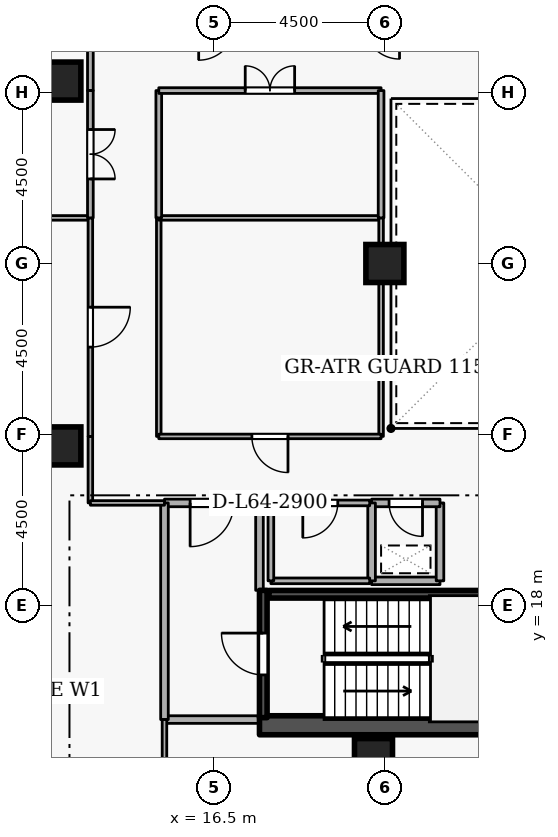
"""IFC4 building model, lengths in metres.
Left out: names, types, materials, properties, quantities, classifications, styles, units other than length and angle.
Written with IfcOpenShell. Run it as: python <this file> out.ifc"""

import sys

from ifc_helpers import new_model, si_unit, direction, frame, frame_2d, origin, origin_2d, place, context, subcontext, project, spatial, rectangle, extrude, element, fill, save


model = new_model("IFC4")
c1 = context("Model", 3, precision=1e-05, world=origin(), true_north=direction((0.0, 1.0)))
c2 = subcontext(c1, "Body", "Model", "MODEL_VIEW")
j1 = project(units=[si_unit("LENGTHUNIT", "METRE"), si_unit("PLANEANGLEUNIT", "RADIAN")], contexts=[c1])
p1 = place(None, origin())
s1 = spatial("IfcSite", under=j1, at=p1, CompositionType="ELEMENT")
p2 = place(p1, origin())
s2 = spatial("IfcBuilding", under=s1, at=p2, CompositionType="ELEMENT")
p3 = place(p2, frame((0.0, 0.0, 240.3)))
s3 = spatial("IfcBuildingStorey", under=s2, at=p3, CompositionType="ELEMENT", Elevation=240.3)
p4 = place(p3, frame((17.7, 14.85, 0.0), z_axis=(0.0, 0.0, 1.0), x_axis=(1.0, 0.0, 0.0)))
e1 = element("IfcWall", 1, at=p4, inside=s3, PredefinedType="SHEAR", context=c2, shape_type="SweptSolid", body=[
    extrude(rectangle(XDim=15.6, YDim=0.5, at=frame_2d((7.8, 0.0))), origin(), (0.0, 0.0, 1.0), 3.6),
])
for number, where, z_axis, x_axis in (
    (2, (12.5, 22.2, 0.0), (0.0, 0.0, 1.0), (1.0, 0.0, 0.0)),
    (3, (12.5, 31.8, 0.0), (0.0, 0.0, 1.0), (1.0, 0.0, 0.0)),
    (4, (20.7, 14.0, 0.0), (0.0, 0.0, 1.0), (1.0, 0.0, 0.0)),
    (5, (21.0, 27.0, 0.0), (0.0, 0.0, 1.0), (1.0, 0.0, 0.0)),
):
    element("IfcColumn", number, at=place(p3, frame(where, z_axis=z_axis, x_axis=x_axis)), inside=s3, PredefinedType="COLUMN", context=c2, shape_type="SweptSolid", body=[
        extrude(rectangle(XDim=1.0, YDim=1.0, at=origin_2d()), origin(), (0.0, 0.0, 1.0), 3.6),
    ])
p5 = place(p3, frame((17.8, 15.05, 0.0), z_axis=(0.0, 0.0, 1.0), x_axis=(0.0, 1.0, 0.0)))
e6 = element("IfcWall", 6, at=p5, inside=s3, PredefinedType="SHEAR", context=c2, shape_type="SweptSolid", body=[
    extrude(rectangle(XDim=3.35, YDim=0.2, at=frame_2d((1.675, 0.0))), origin(), (0.0, 0.0, 1.0), 3.6),
])
p6 = place(p5, frame((1.125, 0.0, 0.0)))
e7 = element("IfcOpeningElement", 7, at=p6, cuts=e6, PredefinedType="OPENING", context=c2, shape_type="SweptSolid", body=[
    extrude(rectangle(XDim=1.1, YDim=2.1, at=frame_2d((0.55, 1.05))), frame((0.0, 0.11, 0.0), z_axis=(0.0, -1.0, 0.0), x_axis=(1.0, 0.0, 0.0)), (0.0, 0.0, 1.0), 0.22),
])
p7 = place(p3, frame((25.05, 18.297, 0.0), z_axis=(0.0, 0.0, 1.0), x_axis=(-1.0, 0.0, 0.0)))
e8 = element("IfcWall", 8, at=p7, inside=s3, PredefinedType="SHEAR", context=c2, shape_type="SweptSolid", body=[
    extrude(rectangle(XDim=7.1, YDim=0.2, at=frame_2d((3.55, 0.0))), origin(), (0.0, 0.0, 1.0), 3.6),
])
p8 = place(p3, frame((15.2, 15.0, 0.0), z_axis=(0.0, 0.0, 1.0), x_axis=(1.0, 0.0, 0.0)))
e9 = element("IfcWall", 9, at=p8, inside=s3, PredefinedType="STANDARD", context=c2, shape_type="SweptSolid", body=[
    extrude(rectangle(XDim=2.5, YDim=0.2, at=frame_2d((1.25, 0.0))), origin(), (0.0, 0.0, 1.0), 3.34),
])
p9 = place(p3, frame((17.7, 18.4, 0.0), z_axis=(0.0, 0.0, 1.0), x_axis=(0.0, 1.0, 0.0)))
e10 = element("IfcWall", 10, at=p9, inside=s3, PredefinedType="STANDARD", context=c2, shape_type="SweptSolid", body=[
    extrude(rectangle(XDim=2.3, YDim=0.2, at=frame_2d((1.15, 0.0))), origin(), (0.0, 0.0, 1.0), 2.545),
])
p10 = place(p3, frame((17.7, 20.7, 0.0), z_axis=(0.0, 0.0, 1.0), x_axis=(-1.0, 0.0, 0.0)))
e11 = element("IfcWall", 11, at=p10, inside=s3, PredefinedType="STANDARD", context=c2, shape_type="SweptSolid", body=[
    extrude(rectangle(XDim=2.5, YDim=0.2, at=frame_2d((1.25, 0.0))), origin(), (0.0, 0.0, 1.0), 3.34),
])
p11 = place(p10, frame((0.675, 0.0, 0.0)))
e12 = element("IfcOpeningElement", 12, at=p11, cuts=e11, PredefinedType="OPENING", context=c2, shape_type="SweptSolid", body=[
    extrude(rectangle(XDim=1.15, YDim=2.1, at=frame_2d((0.575, 1.05))), frame((0.0, 0.11, 0.0), z_axis=(0.0, -1.0, 0.0), x_axis=(1.0, 0.0, 0.0)), (0.0, 0.0, 1.0), 0.22),
])
p12 = place(p3, frame((15.2, 20.7, 0.0), z_axis=(0.0, 0.0, 1.0), x_axis=(0.0, -1.0, 0.0)))
e13 = element("IfcWall", 13, at=p12, inside=s3, PredefinedType="STANDARD", context=c2, shape_type="SweptSolid", body=[
    extrude(rectangle(XDim=5.7, YDim=0.2, at=frame_2d((2.85, 0.0))), origin(), (0.0, 0.0, 1.0), 3.34),
])
p13 = place(p3, frame((20.65, 18.65, 0.0), z_axis=(0.0, 0.0, 1.0), x_axis=(1.0, 0.0, 0.0)))
e14 = element("IfcWall", 14, at=p13, inside=s3, PredefinedType="STANDARD", context=c2, shape_type="SweptSolid", body=[
    extrude(rectangle(XDim=1.8, YDim=0.2, at=frame_2d((0.9, 0.0))), origin(), (0.0, 0.0, 1.0), 3.34),
])
p14 = place(p3, frame((22.45, 18.65, 0.0), z_axis=(0.0, 0.0, 1.0), x_axis=(0.0, 1.0, 0.0)))
e15 = element("IfcWall", 15, at=p14, inside=s3, PredefinedType="STANDARD", context=c2, shape_type="SweptSolid", body=[
    extrude(rectangle(XDim=2.05, YDim=0.2, at=frame_2d((1.025, 0.0))), origin(), (0.0, 0.0, 1.0), 3.34),
])
p15 = place(p3, frame((22.45, 20.7, 0.0), z_axis=(0.0, 0.0, 1.0), x_axis=(-1.0, 0.0, 0.0)))
e16 = element("IfcWall", 16, at=p15, inside=s3, PredefinedType="STANDARD", context=c2, shape_type="SweptSolid", body=[
    extrude(rectangle(XDim=1.8, YDim=0.2, at=frame_2d((0.9, 0.0))), origin(), (0.0, 0.0, 1.0), 3.34),
])
p16 = place(p15, frame((0.46, 0.0, 0.0)))
e17 = element("IfcOpeningElement", 17, at=p16, cuts=e16, PredefinedType="OPENING", context=c2, shape_type="SweptSolid", body=[
    extrude(rectangle(XDim=0.88, YDim=2.04, at=frame_2d((0.44, 1.02))), frame((0.0, 0.11, 0.0), z_axis=(0.0, -1.0, 0.0), x_axis=(1.0, 0.0, 0.0)), (0.0, 0.0, 1.0), 0.22),
])
p17 = place(p3, frame((20.65, 20.7, 0.0), z_axis=(0.0, 0.0, 1.0), x_axis=(0.0, -1.0, 0.0)))
e18 = element("IfcWall", 18, at=p17, inside=s3, PredefinedType="STANDARD", context=c2, shape_type="SweptSolid", body=[
    extrude(rectangle(XDim=2.05, YDim=0.2, at=frame_2d((1.025, 0.0))), origin(), (0.0, 0.0, 1.0), 3.34),
])
p18 = place(p3, frame((18.0, 18.65, 0.0), z_axis=(0.0, 0.0, 1.0), x_axis=(1.0, 0.0, 0.0)))
e19 = element("IfcWall", 19, at=p18, inside=s3, PredefinedType="PARTITIONING", context=c2, shape_type="SweptSolid", body=[
    extrude(rectangle(XDim=2.6, YDim=0.15, at=frame_2d((1.3, 0.0))), origin(), (0.0, 0.0, 1.0), 3.34),
])
p19 = place(p3, frame((20.6, 20.7, 0.0), z_axis=(0.0, 0.0, 1.0), x_axis=(-1.0, 0.0, 0.0)))
e20 = element("IfcWall", 20, at=p19, inside=s3, PredefinedType="PARTITIONING", context=c2, shape_type="SweptSolid", body=[
    extrude(rectangle(XDim=2.6, YDim=0.15, at=frame_2d((1.3, 0.0))), origin(), (0.0, 0.0, 1.0), 3.34),
])
p20 = place(p19, frame((0.84, 0.0, 0.0)))
e21 = element("IfcOpeningElement", 21, at=p20, cuts=e20, PredefinedType="OPENING", context=c2, shape_type="SweptSolid", body=[
    extrude(rectangle(XDim=0.92, YDim=2.08, at=frame_2d((0.46, 1.04))), frame((0.0, 0.085, 0.0), z_axis=(0.0, -1.0, 0.0), x_axis=(1.0, 0.0, 0.0)), (0.0, 0.0, 1.0), 0.17),
])
p21 = place(p3, frame((18.0, 20.7, 0.0), z_axis=(0.0, 0.0, 1.0), x_axis=(0.0, -1.0, 0.0)))
e22 = element("IfcWall", 22, at=p21, inside=s3, PredefinedType="PARTITIONING", context=c2, shape_type="SweptSolid", body=[
    extrude(rectangle(XDim=2.05, YDim=0.15, at=frame_2d((1.025, 0.0))), origin(), (0.0, 0.0, 1.0), 2.545),
])
p22 = place(p3, frame((13.25, 22.45, 0.0), z_axis=(0.0, 0.0, 1.0), x_axis=(0.0, -1.0, 0.0)))
e23 = element("IfcWall", 23, at=p22, inside=s3, PredefinedType="PARTITIONING", context=c2, shape_type="SweptSolid", body=[
    extrude(rectangle(XDim=1.75, YDim=0.12, at=frame_2d((0.875, 0.0))), origin(), (0.0, 0.0, 1.0), 3.34),
])
p23 = place(p3, frame((13.25, 20.7, 0.0), z_axis=(0.0, 0.0, 1.0), x_axis=(1.0, 0.0, 0.0)))
e24 = element("IfcWall", 24, at=p23, inside=s3, PredefinedType="PARTITIONING", context=c2, shape_type="SweptSolid", body=[
    extrude(rectangle(XDim=1.95, YDim=0.12, at=frame_2d((0.975, 0.0))), origin(), (0.0, 0.0, 1.0), 3.34),
])
p24 = place(p3, frame((15.2, 15.0, 0.0), z_axis=(0.0, 0.0, 1.0), x_axis=(0.0, -1.0, 0.0)))
e25 = element("IfcWall", 25, at=p24, inside=s3, PredefinedType="PARTITIONING", context=c2, shape_type="SweptSolid", body=[
    extrude(rectangle(XDim=11.72, YDim=0.12, at=frame_2d((5.86, 0.0))), origin(), (0.0, 0.0, 1.0), 3.34),
])
p25 = place(p3, frame((1.78, 28.2, 0.0), z_axis=(0.0, 0.0, 1.0), x_axis=(1.0, 0.0, 0.0)))
e26 = element("IfcWall", 26, at=p25, inside=s3, PredefinedType="PARTITIONING", context=c2, shape_type="SweptSolid", body=[
    extrude(rectangle(XDim=11.47, YDim=0.12, at=frame_2d((5.735, 0.0))), origin(), (0.0, 0.0, 1.0), 3.34),
])
p26 = place(p3, frame((13.25, 28.2, 0.0), z_axis=(0.0, 0.0, 1.0), x_axis=(0.0, -1.0, 0.0)))
e27 = element("IfcWall", 27, at=p26, inside=s3, PredefinedType="PARTITIONING", context=c2, shape_type="SweptSolid", body=[
    extrude(rectangle(XDim=5.75, YDim=0.12, at=frame_2d((2.875, 0.0))), origin(), (0.0, 0.0, 1.0), 3.34),
])
p27 = place(p26, frame((2.35, 0.0, 0.0)))
e28 = element("IfcOpeningElement", 28, at=p27, cuts=e27, PredefinedType="OPENING", context=c2, shape_type="SweptSolid", body=[
    extrude(rectangle(XDim=1.05, YDim=2.1, at=frame_2d((0.525, 1.05))), frame((0.0, 0.07, 0.0), z_axis=(0.0, -1.0, 0.0), x_axis=(1.0, 0.0, 0.0)), (0.0, 0.0, 1.0), 0.14),
])
p28 = place(p3, frame((13.25, 33.3, 0.0), z_axis=(0.0, 0.0, 1.0), x_axis=(0.0, -1.0, 0.0)))
e29 = element("IfcWall", 29, at=p28, inside=s3, PredefinedType="PARTITIONING", context=c2, shape_type="SweptSolid", body=[
    extrude(rectangle(XDim=1.75, YDim=0.15, at=frame_2d((0.875, 0.0))), origin(), (0.0, 0.0, 1.0), 3.34),
])
p29 = place(p3, frame((13.25, 31.55, 0.0), z_axis=(0.0, 0.0, 1.0), x_axis=(0.0, -1.0, 0.0)))
e30 = element("IfcWall", 30, at=p29, inside=s3, PredefinedType="PARTITIONING", context=c2, shape_type="SweptSolid", body=[
    extrude(rectangle(XDim=3.35, YDim=0.15, at=frame_2d((1.675, 0.0))), origin(), (0.0, 0.0, 1.0), 3.34),
])
p30 = place(p29, frame((1.025, 0.0, 0.0)))
e31 = element("IfcOpeningElement", 31, at=p30, cuts=e30, PredefinedType="OPENING", context=c2, shape_type="SweptSolid", body=[
    extrude(rectangle(XDim=1.3, YDim=2.12, at=frame_2d((0.65, 1.06))), frame((0.0, 0.085, 0.0), z_axis=(0.0, -1.0, 0.0), x_axis=(1.0, 0.0, 0.0)), (0.0, 0.0, 1.0), 0.17),
])
p31 = place(p3, frame((15.05, 22.45, 0.0), z_axis=(0.0, 0.0, 1.0), x_axis=(0.0, 1.0, 0.0)))
e32 = element("IfcWall", 32, at=p31, inside=s3, PredefinedType="PARTITIONING", context=c2, shape_type="SweptSolid", body=[
    extrude(rectangle(XDim=5.75, YDim=0.12, at=frame_2d((2.875, 0.0))), origin(), (0.0, 0.0, 1.0), 3.34),
])
p32 = place(p3, frame((15.05, 28.2, 0.0), z_axis=(0.0, 0.0, 1.0), x_axis=(1.0, 0.0, 0.0)))
e33 = element("IfcWall", 33, at=p32, inside=s3, PredefinedType="PARTITIONING", context=c2, shape_type="SweptSolid", body=[
    extrude(rectangle(XDim=5.85, YDim=0.12, at=frame_2d((2.925, 0.0))), origin(), (0.0, 0.0, 1.0), 3.34),
])
p33 = place(p3, frame((20.9, 28.2, 0.0), z_axis=(0.0, 0.0, 1.0), x_axis=(0.0, -1.0, 0.0)))
e34 = element("IfcWall", 34, at=p33, inside=s3, PredefinedType="PARTITIONING", context=c2, shape_type="SweptSolid", body=[
    extrude(rectangle(XDim=5.75, YDim=0.12, at=frame_2d((2.875, 0.0))), origin(), (0.0, 0.0, 1.0), 3.34),
])
p34 = place(p3, frame((20.9, 22.45, 0.0), z_axis=(0.0, 0.0, 1.0), x_axis=(-1.0, 0.0, 0.0)))
e35 = element("IfcWall", 35, at=p34, inside=s3, PredefinedType="PARTITIONING", context=c2, shape_type="SweptSolid", body=[
    extrude(rectangle(XDim=5.85, YDim=0.12, at=frame_2d((2.925, 0.0))), origin(), (0.0, 0.0, 1.0), 3.34),
])
p35 = place(p34, frame((2.45, 0.0, 0.0)))
e36 = element("IfcOpeningElement", 36, at=p35, cuts=e35, PredefinedType="OPENING", context=c2, shape_type="SweptSolid", body=[
    extrude(rectangle(XDim=0.95, YDim=2.1, at=frame_2d((0.475, 1.05))), frame((0.0, 0.07, 0.0), z_axis=(0.0, -1.0, 0.0), x_axis=(1.0, 0.0, 0.0)), (0.0, 0.0, 1.0), 0.14),
])
p36 = place(p3, frame((15.05, 28.2, 0.0), z_axis=(0.0, 0.0, 1.0), x_axis=(0.0, 1.0, 0.0)))
e37 = element("IfcWall", 37, at=p36, inside=s3, PredefinedType="PARTITIONING", context=c2, shape_type="SweptSolid", body=[
    extrude(rectangle(XDim=3.35, YDim=0.15, at=frame_2d((1.675, 0.0))), origin(), (0.0, 0.0, 1.0), 3.34),
])
p37 = place(p3, frame((15.05, 31.55, 0.0), z_axis=(0.0, 0.0, 1.0), x_axis=(1.0, 0.0, 0.0)))
e38 = element("IfcWall", 38, at=p37, inside=s3, PredefinedType="PARTITIONING", context=c2, shape_type="SweptSolid", body=[
    extrude(rectangle(XDim=5.85, YDim=0.15, at=frame_2d((2.925, 0.0))), origin(), (0.0, 0.0, 1.0), 3.34),
])
p38 = place(p37, frame((2.275, 0.0, 0.0)))
e39 = element("IfcOpeningElement", 39, at=p38, cuts=e38, PredefinedType="OPENING", context=c2, shape_type="SweptSolid", body=[
    extrude(rectangle(XDim=1.3, YDim=2.12, at=frame_2d((0.65, 1.06))), frame((0.0, 0.085, 0.0), z_axis=(0.0, -1.0, 0.0), x_axis=(1.0, 0.0, 0.0)), (0.0, 0.0, 1.0), 0.17),
])
p39 = place(p3, frame((20.9, 31.55, 0.0), z_axis=(0.0, 0.0, 1.0), x_axis=(0.0, -1.0, 0.0)))
e40 = element("IfcWall", 40, at=p39, inside=s3, PredefinedType="PARTITIONING", context=c2, shape_type="SweptSolid", body=[
    extrude(rectangle(XDim=3.35, YDim=0.15, at=frame_2d((1.675, 0.0))), origin(), (0.0, 0.0, 1.0), 3.34),
])
p40 = place(p6, origin())
e41 = element("IfcDoor", 41, at=p40, inside=s3, OperationType="SINGLE_SWING_RIGHT", PredefinedType="DOOR", context=c2, shape_type="SweptSolid", body=[
    extrude(rectangle(XDim=1.1, YDim=2.1, at=frame_2d((0.55, 1.05))), frame((0.0, 0.025, 0.0), z_axis=(0.0, -1.0, 0.0), x_axis=(1.0, 0.0, 0.0)), (0.0, 0.0, 1.0), 0.05),
])
fill(e7, e41)
p41 = place(p11, origin())
e42 = element("IfcDoor", 42, at=p41, inside=s3, OperationType="SINGLE_SWING_RIGHT", PredefinedType="DOOR", context=c2, shape_type="SweptSolid", body=[
    extrude(rectangle(XDim=1.15, YDim=2.1, at=frame_2d((0.575, 1.05))), frame((0.0, 0.025, 0.0), z_axis=(0.0, -1.0, 0.0), x_axis=(1.0, 0.0, 0.0)), (0.0, 0.0, 1.0), 0.05),
])
fill(e12, e42)
p42 = place(p16, origin())
e43 = element("IfcDoor", 43, at=p42, inside=s3, OperationType="SINGLE_SWING_LEFT", PredefinedType="DOOR", context=c2, shape_type="SweptSolid", body=[
    extrude(rectangle(XDim=0.88, YDim=2.04, at=frame_2d((0.44, 1.02))), frame((0.0, 0.025, 0.0), z_axis=(0.0, -1.0, 0.0), x_axis=(1.0, 0.0, 0.0)), (0.0, 0.0, 1.0), 0.05),
])
fill(e17, e43)
p43 = place(p20, origin())
e44 = element("IfcDoor", 44, at=p43, inside=s3, OperationType="SINGLE_SWING_RIGHT", PredefinedType="DOOR", context=c2, shape_type="SweptSolid", body=[
    extrude(rectangle(XDim=0.92, YDim=2.08, at=frame_2d((0.46, 1.04))), frame((0.0, 0.025, 0.0), z_axis=(0.0, -1.0, 0.0), x_axis=(1.0, 0.0, 0.0)), (0.0, 0.0, 1.0), 0.05),
])
fill(e21, e44)
p44 = place(p27, origin())
e45 = element("IfcDoor", 45, at=p44, inside=s3, OperationType="SINGLE_SWING_LEFT", PredefinedType="DOOR", context=c2, shape_type="SweptSolid", body=[
    extrude(rectangle(XDim=1.05, YDim=2.1, at=frame_2d((0.525, 1.05))), frame((0.0, 0.025, 0.0), z_axis=(0.0, -1.0, 0.0), x_axis=(1.0, 0.0, 0.0)), (0.0, 0.0, 1.0), 0.05),
])
fill(e28, e45)
p45 = place(p30, origin())
e46 = element("IfcDoor", 46, at=p45, inside=s3, OperationType="DOUBLE_DOOR_SINGLE_SWING", PredefinedType="DOOR", context=c2, shape_type="SweptSolid", body=[
    extrude(rectangle(XDim=1.3, YDim=2.12, at=frame_2d((0.65, 1.06))), frame((0.0, 0.025, 0.0), z_axis=(0.0, -1.0, 0.0), x_axis=(1.0, 0.0, 0.0)), (0.0, 0.0, 1.0), 0.05),
])
fill(e31, e46)
p46 = place(p35, origin())
e47 = element("IfcDoor", 47, at=p46, inside=s3, OperationType="SINGLE_SWING_LEFT", PredefinedType="DOOR", context=c2, shape_type="SweptSolid", body=[
    extrude(rectangle(XDim=0.95, YDim=2.1, at=frame_2d((0.475, 1.05))), frame((0.0, 0.025, 0.0), z_axis=(0.0, -1.0, 0.0), x_axis=(1.0, 0.0, 0.0)), (0.0, 0.0, 1.0), 0.05),
])
fill(e36, e47)
p47 = place(p38, origin())
e48 = element("IfcDoor", 48, at=p47, inside=s3, OperationType="DOUBLE_DOOR_SINGLE_SWING", PredefinedType="DOOR", context=c2, shape_type="SweptSolid", body=[
    extrude(rectangle(XDim=1.3, YDim=2.12, at=frame_2d((0.65, 1.06))), frame((0.0, 0.025, 0.0), z_axis=(0.0, -1.0, 0.0), x_axis=(1.0, 0.0, 0.0)), (0.0, 0.0, 1.0), 0.05),
])
fill(e39, e48)
save(model, sys.argv[1])
